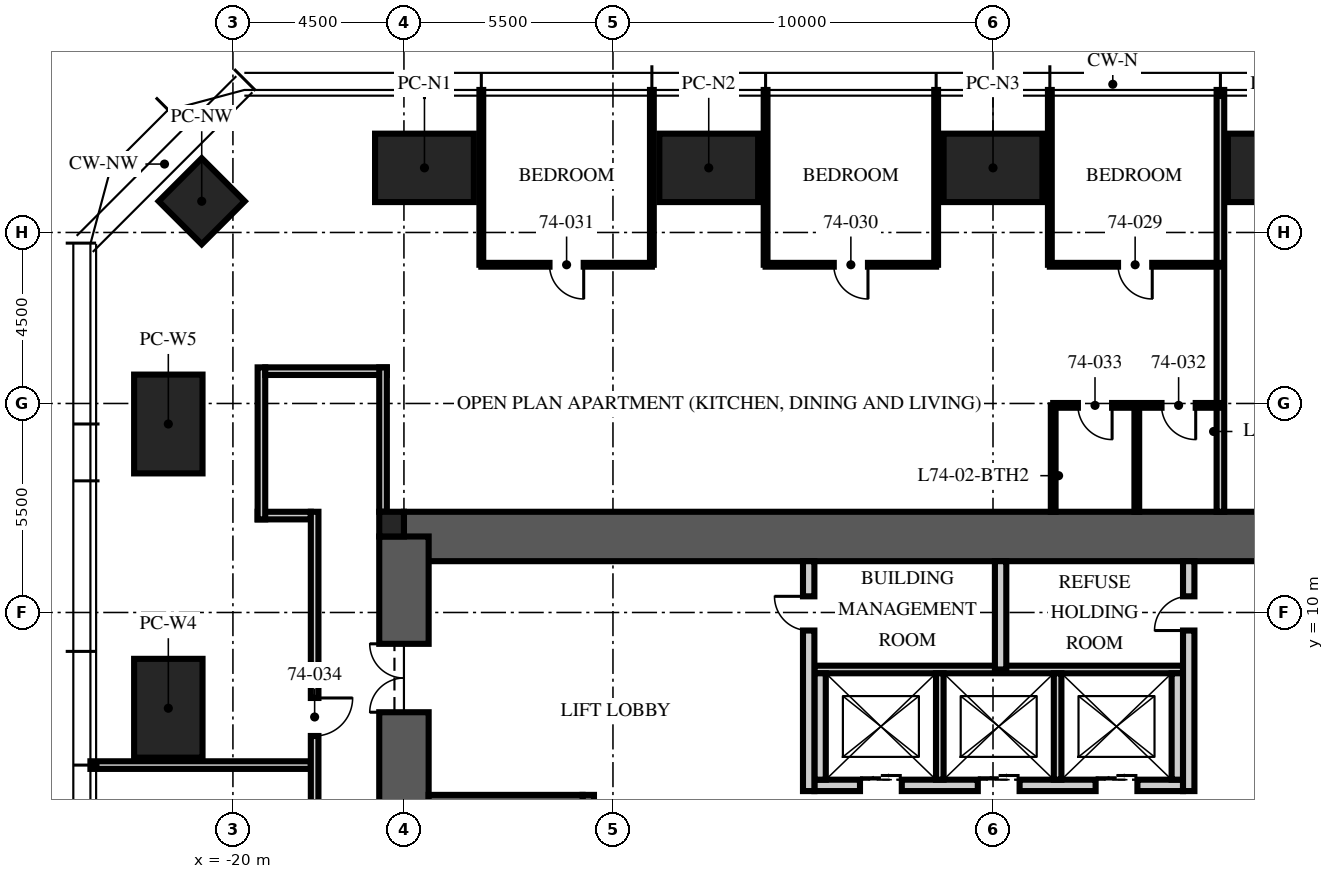
"""IFC4 building model, lengths in metres.
Left out: names, types, materials, properties, quantities, classifications, styles, units other than length and angle.
Written with IfcOpenShell. Run it as: python <this file> out.ifc"""

import sys

from ifc_helpers import new_model, si_unit, direction, frame, frame_2d, origin, origin_2d, place, context, subcontext, project, spatial, rectangle, extrude, element, fill, save


model = new_model("IFC4")
c1 = context("Model", 3, precision=1e-05, world=origin(), true_north=direction((0.0, 1.0)))
c2 = subcontext(c1, "Body", "Model", "MODEL_VIEW")
j1 = project(units=[si_unit("LENGTHUNIT", "METRE"), si_unit("PLANEANGLEUNIT", "RADIAN")], contexts=[c1])
p1 = place(None, origin())
s1 = spatial("IfcSite", under=j1, at=p1, CompositionType="ELEMENT")
p2 = place(p1, origin())
s2 = spatial("IfcBuilding", under=s1, at=p2, CompositionType="ELEMENT")
p3 = place(p2, frame((0.0, 0.0, 297.0)))
s3 = spatial("IfcBuildingStorey", under=s2, at=p3, CompositionType="ELEMENT", Elevation=297.0)
p4 = place(p3, frame((-15.5, 12.0, -0.25), z_axis=(0.0, 0.0, 1.0), x_axis=(1.0, 0.0, 0.0)))
e1 = element("IfcWall", 1, at=p4, inside=s3, PredefinedType="SHEAR", context=c2, shape_type="SweptSolid", body=[
    extrude(rectangle(XDim=31.0, YDim=1.3, at=frame_2d((15.5, 0.0))), origin(), (0.0, 0.0, 1.0), 3.75),
])
p5 = place(p3, frame((-15.5, -12.0, -0.25), z_axis=(0.0, 0.0, 1.0), x_axis=(0.0, 1.0, 0.0)))
e2 = element("IfcWall", 2, at=p5, inside=s3, PredefinedType="SHEAR", context=c2, shape_type="SweptSolid", body=[
    extrude(rectangle(XDim=24.0, YDim=1.3, at=frame_2d((12.0, 0.0))), origin(), (0.0, 0.0, 1.0), 3.75),
])
p6 = place(p5, frame((3.125, 0.0, 0.25)))
e3 = element("IfcOpeningElement", 3, at=p6, cuts=e2, PredefinedType="OPENING", context=c2, shape_type="SweptSolid", body=[
    extrude(rectangle(XDim=1.2, YDim=2.1, at=frame_2d((0.6, 1.05))), frame((0.0, 0.66, 0.0), z_axis=(0.0, -1.0, 0.0), x_axis=(1.0, 0.0, 0.0)), (0.0, 0.0, 1.0), 1.32),
])
p7 = place(p5, frame((19.375, 0.0, 0.25)))
e4 = element("IfcOpeningElement", 4, at=p7, cuts=e2, PredefinedType="OPENING", context=c2, shape_type="SweptSolid", body=[
    extrude(rectangle(XDim=1.8, YDim=2.1, at=frame_2d((0.9, 1.05))), frame((0.0, 0.66, 0.0), z_axis=(0.0, -1.0, 0.0), x_axis=(1.0, 0.0, 0.0)), (0.0, 0.0, 1.0), 1.32),
])
p8 = place(p3, frame((-15.825, 12.325, -0.25), z_axis=(0.0, 0.0, 1.0), x_axis=(1.0, 0.0, 0.0)))
e5 = element("IfcColumn", 5, at=p8, inside=s3, PredefinedType="COLUMN", context=c2, shape_type="SweptSolid", body=[
    extrude(rectangle(XDim=0.65, YDim=0.65, at=origin_2d()), origin(), (0.0, 0.0, 1.0), 3.75),
])
for number, where, z_axis, x_axis in (
    (6, (-14.96, 21.7, 0.0), (0.0, 0.0, 1.0), (1.0, 0.0, 0.0)),
    (7, (-7.48, 21.7, 0.0), (0.0, 0.0, 1.0), (1.0, 0.0, 0.0)),
    (8, (0.0, 21.7, 0.0), (0.0, 0.0, 1.0), (1.0, 0.0, 0.0)),
    (9, (7.48, 21.7, 0.0), (0.0, 0.0, 1.0), (1.0, 0.0, 0.0)),
    (10, (-21.7, 7.48, 0.0), (0.0, 0.0, 1.0), (0.0, 1.0, 0.0)),
    (11, (-21.7, 14.96, 0.0), (0.0, 0.0, 1.0), (0.0, 1.0, 0.0)),
):
    element("IfcColumn", number, at=place(p3, frame(where, z_axis=z_axis, x_axis=x_axis)), inside=s3, PredefinedType="COLUMN", context=c2, shape_type="SweptSolid", body=[
        extrude(rectangle(XDim=2.6, YDim=1.8, at=origin_2d()), origin(), (0.0, 0.0, 1.0), 3.75),
    ])
p9 = place(p3, frame((-20.821, 20.821, 0.0), z_axis=(0.0, 0.0, 1.0), x_axis=(0.707106781187, 0.707106781187, 0.0)))
e12 = element("IfcColumn", 12, at=p9, inside=s3, PredefinedType="COLUMN", context=c2, shape_type="SweptSolid", body=[
    extrude(rectangle(XDim=1.6, YDim=1.6, at=origin_2d()), origin(), (0.0, 0.0, 1.0), 3.75),
])
p10 = place(p3, frame((-10.65, -4.9, 0.0), z_axis=(0.0, 0.0, 1.0), x_axis=(0.0, 1.0, 0.0)))
e13 = element("IfcWall", 13, at=p10, inside=s3, PredefinedType="SOLIDWALL", context=c2, shape_type="SweptSolid", body=[
    extrude(rectangle(XDim=10.1, YDim=0.3, at=frame_2d((5.05, 0.0))), origin(), (0.0, 0.0, 1.0), 3.5),
])
p11 = place(p3, frame((-14.85, 5.05, 0.0), z_axis=(0.0, 0.0, 1.0), x_axis=(1.0, 0.0, 0.0)))
e14 = element("IfcWall", 14, at=p11, inside=s3, PredefinedType="SOLIDWALL", context=c2, shape_type="SweptSolid", body=[
    extrude(rectangle(XDim=4.05, YDim=0.3, at=frame_2d((2.025, 0.0))), origin(), (0.0, 0.0, 1.0), 3.5),
])
p12 = place(p3, frame((-4.7, 5.45, 0.0), z_axis=(0.0, 0.0, 1.0), x_axis=(1.0, 0.0, 0.0)))
e15 = element("IfcWall", 15, at=p12, inside=s3, PredefinedType="PARTITIONING", context=c2, shape_type="SweptSolid", body=[
    extrude(rectangle(XDim=9.7, YDim=0.3, at=frame_2d((4.85, 0.0))), origin(), (0.0, 0.0, 1.0), 3.5),
])
p13 = place(p12, frame((1.2, 0.0, 0.0)))
e16 = element("IfcOpeningElement", 16, at=p13, cuts=e15, PredefinedType="OPENING", context=c2, shape_type="SweptSolid", body=[
    extrude(rectangle(XDim=1.1, YDim=2.1, at=frame_2d((0.55, 1.05))), frame((0.0, 0.16, 0.0), z_axis=(0.0, -1.0, 0.0), x_axis=(1.0, 0.0, 0.0)), (0.0, 0.0, 1.0), 0.32),
])
p14 = place(p12, frame((4.3, 0.0, 0.0)))
e17 = element("IfcOpeningElement", 17, at=p14, cuts=e15, PredefinedType="OPENING", context=c2, shape_type="SweptSolid", body=[
    extrude(rectangle(XDim=1.1, YDim=2.1, at=frame_2d((0.55, 1.05))), frame((0.0, 0.16, 0.0), z_axis=(0.0, -1.0, 0.0), x_axis=(1.0, 0.0, 0.0)), (0.0, 0.0, 1.0), 0.32),
])
p15 = place(p12, frame((7.4, 0.0, 0.0)))
e18 = element("IfcOpeningElement", 18, at=p15, cuts=e15, PredefinedType="OPENING", context=c2, shape_type="SweptSolid", body=[
    extrude(rectangle(XDim=1.1, YDim=2.1, at=frame_2d((0.55, 1.05))), frame((0.0, 0.16, 0.0), z_axis=(0.0, -1.0, 0.0), x_axis=(1.0, 0.0, 0.0)), (0.0, 0.0, 1.0), 0.32),
])
p16 = place(p3, frame((-4.7, 8.5, 0.0), z_axis=(0.0, 0.0, 1.0), x_axis=(1.0, 0.0, 0.0)))
e19 = element("IfcWall", 19, at=p16, inside=s3, PredefinedType="PARTITIONING", context=c2, shape_type="SweptSolid", body=[
    extrude(rectangle(XDim=9.7, YDim=0.2, at=frame_2d((4.85, 0.0))), origin(), (0.0, 0.0, 1.0), 3.5),
])
for number, where, z_axis, x_axis in (
    (20, (-4.55, 5.6, 0.0), (0.0, 0.0, 1.0), (0.0, 1.0, 0.0)),
    (21, (4.85, 5.6, 0.0), (0.0, 0.0, 1.0), (0.0, 1.0, 0.0)),
):
    element("IfcWall", number, at=place(p3, frame(where, z_axis=z_axis, x_axis=x_axis)), inside=s3, PredefinedType="PARTITIONING", context=c2, shape_type="SweptSolid", body=[
        extrude(rectangle(XDim=2.8, YDim=0.3, at=frame_2d((1.4, 0.0))), origin(), (0.0, 0.0, 1.0), 3.5),
    ])
for number, where, z_axis, x_axis in (
    (22, (-1.4, 5.6, 0.0), (0.0, 0.0, 1.0), (0.0, 1.0, 0.0)),
    (23, (1.7, 5.6, 0.0), (0.0, 0.0, 1.0), (0.0, 1.0, 0.0)),
):
    element("IfcWall", number, at=place(p3, frame(where, z_axis=z_axis, x_axis=x_axis)), inside=s3, PredefinedType="PARTITIONING", context=c2, shape_type="SweptSolid", body=[
        extrude(rectangle(XDim=2.8, YDim=0.2, at=frame_2d((1.4, 0.0))), origin(), (0.0, 0.0, 1.0), 3.5),
    ])
p17 = place(p3, frame((-4.85, 5.3, 0.0), z_axis=(0.0, 0.0, 1.0), x_axis=(0.0, 1.0, 0.0)))
e24 = element("IfcWall", 24, at=p17, inside=s3, PredefinedType="PARTITIONING", context=c2, shape_type="SweptSolid", body=[
    extrude(rectangle(XDim=6.05, YDim=0.3, at=frame_2d((3.025, 0.0))), origin(), (0.0, 0.0, 1.0), 3.5),
])
p18 = place(p17, frame((4.225, 0.0, 0.0)))
e25 = element("IfcOpeningElement", 25, at=p18, cuts=e24, PredefinedType="OPENING", context=c2, shape_type="SweptSolid", body=[
    extrude(rectangle(XDim=0.9, YDim=2.1, at=frame_2d((0.45, 1.05))), frame((0.0, 0.16, 0.0), z_axis=(0.0, -1.0, 0.0), x_axis=(1.0, 0.0, 0.0)), (0.0, 0.0, 1.0), 0.32),
])
p19 = place(p3, frame((5.15, 5.3, 0.0), z_axis=(0.0, 0.0, 1.0), x_axis=(0.0, 1.0, 0.0)))
e26 = element("IfcWall", 26, at=p19, inside=s3, PredefinedType="PARTITIONING", context=c2, shape_type="SweptSolid", body=[
    extrude(rectangle(XDim=6.05, YDim=0.3, at=frame_2d((3.025, 0.0))), origin(), (0.0, 0.0, 1.0), 3.5),
])
p20 = place(p19, frame((4.225, 0.0, 0.0)))
e27 = element("IfcOpeningElement", 27, at=p20, cuts=e26, PredefinedType="OPENING", context=c2, shape_type="SweptSolid", body=[
    extrude(rectangle(XDim=0.9, YDim=2.1, at=frame_2d((0.45, 1.05))), frame((0.0, 0.16, 0.0), z_axis=(0.0, -1.0, 0.0), x_axis=(1.0, 0.0, 0.0)), (0.0, 0.0, 1.0), 0.32),
])
p21 = place(p3, frame((0.2, 8.5, 0.0), z_axis=(0.0, 0.0, 1.0), x_axis=(0.0, 1.0, 0.0)))
e28 = element("IfcWall", 28, at=p21, inside=s3, PredefinedType="PARTITIONING", context=c2, shape_type="SweptSolid", body=[
    extrude(rectangle(XDim=2.85, YDim=0.3, at=frame_2d((1.425, 0.0))), origin(), (0.0, 0.0, 1.0), 3.5),
])
p22 = place(p3, frame((-17.95, 12.55, 0.0), z_axis=(0.0, 0.0, 1.0), x_axis=(-1.0, 0.0, 0.0)))
e29 = element("IfcWall", 29, at=p22, inside=s3, PredefinedType="PARTITIONING", context=c2, shape_type="SweptSolid", body=[
    extrude(rectangle(XDim=1.4, YDim=0.2, at=frame_2d((0.7, 0.0))), origin(), (0.0, 0.0, 1.0), 3.5),
])
p23 = place(p3, frame((-19.25, 12.45, 0.0), z_axis=(0.0, 0.0, 1.0), x_axis=(0.0, 1.0, 0.0)))
e30 = element("IfcWall", 30, at=p23, inside=s3, PredefinedType="PARTITIONING", context=c2, shape_type="SweptSolid", body=[
    extrude(rectangle(XDim=4.0, YDim=0.2, at=frame_2d((2.0, 0.0))), origin(), (0.0, 0.0, 1.0), 2.9),
])
p24 = place(p3, frame((-19.15, 16.35, 0.0), z_axis=(0.0, 0.0, 1.0), x_axis=(1.0, 0.0, 0.0)))
e31 = element("IfcWall", 31, at=p24, inside=s3, PredefinedType="PARTITIONING", context=c2, shape_type="SweptSolid", body=[
    extrude(rectangle(XDim=3.2, YDim=0.2, at=frame_2d((1.6, 0.0))), origin(), (0.0, 0.0, 1.0), 2.6),
])
p25 = place(p3, frame((-16.05, 16.45, 0.0), z_axis=(0.0, 0.0, 1.0), x_axis=(0.0, -1.0, 0.0)))
e32 = element("IfcWall", 32, at=p25, inside=s3, PredefinedType="PARTITIONING", context=c2, shape_type="SweptSolid", body=[
    extrude(rectangle(XDim=3.8, YDim=0.2, at=frame_2d((1.9, 0.0))), origin(), (0.0, 0.0, 1.0), 2.6),
])
p26 = place(p3, frame((5.984, 12.65, 0.0), z_axis=(0.0, 0.0, 1.0), x_axis=(0.0, 1.0, 0.0)))
e33 = element("IfcWall", 33, at=p26, inside=s3, PredefinedType="PARTITIONING", context=c2, shape_type="SweptSolid", body=[
    extrude(rectangle(XDim=11.1, YDim=0.2, at=frame_2d((5.55, 0.0))), origin(), (0.0, 0.0, 1.0), 3.01),
])
for number, where, z_axis, x_axis in (
    (34, (1.496, 19.15, 0.0), (0.0, 0.0, 1.0), (0.0, 1.0, 0.0)),
    (35, (-1.496, 19.15, 0.0), (0.0, 0.0, 1.0), (0.0, 1.0, 0.0)),
    (36, (-5.984, 19.15, 0.0), (0.0, 0.0, 1.0), (0.0, 1.0, 0.0)),
    (37, (-8.976, 19.15, 0.0), (0.0, 0.0, 1.0), (0.0, 1.0, 0.0)),
    (38, (-13.464, 19.15, 0.0), (0.0, 0.0, 1.0), (0.0, 1.0, 0.0)),
):
    element("IfcWall", number, at=place(p3, frame(where, z_axis=z_axis, x_axis=x_axis)), inside=s3, PredefinedType="PARTITIONING", context=c2, shape_type="SweptSolid", body=[
        extrude(rectangle(XDim=4.6, YDim=0.1, at=frame_2d((2.3, 0.0))), origin(), (0.0, 0.0, 1.0), 3.01),
    ])
p27 = place(p3, frame((-17.95, 5.984, 0.0), z_axis=(0.0, 0.0, 1.0), x_axis=(-1.0, 0.0, 0.0)))
e39 = element("IfcWall", 39, at=p27, inside=s3, PredefinedType="PARTITIONING", context=c2, shape_type="SweptSolid", body=[
    extrude(rectangle(XDim=5.8, YDim=0.2, at=frame_2d((2.9, 0.0))), origin(), (0.0, 0.0, 1.0), 3.01),
])
p28 = place(p3, frame((5.984, 19.15, 0.0), z_axis=(0.0, 0.0, 1.0), x_axis=(-1.0, 0.0, 0.0)))
e40 = element("IfcWall", 40, at=p28, inside=s3, PredefinedType="PARTITIONING", context=c2, shape_type="SweptSolid", body=[
    extrude(rectangle(XDim=4.488, YDim=0.1, at=frame_2d((2.244, 0.0))), origin(), (0.0, 0.0, 1.0), 2.91),
])
p29 = place(p28, frame((1.794, 0.0, 0.0)))
e41 = element("IfcOpeningElement", 41, at=p29, cuts=e40, PredefinedType="OPENING", context=c2, shape_type="SweptSolid", body=[
    extrude(rectangle(XDim=0.9, YDim=2.1, at=frame_2d((0.45, 1.05))), frame((0.0, 0.06, 0.0), z_axis=(0.0, -1.0, 0.0), x_axis=(1.0, 0.0, 0.0)), (0.0, 0.0, 1.0), 0.12),
])
p30 = place(p3, frame((-1.496, 19.15, 0.0), z_axis=(0.0, 0.0, 1.0), x_axis=(-1.0, 0.0, 0.0)))
e42 = element("IfcWall", 42, at=p30, inside=s3, PredefinedType="PARTITIONING", context=c2, shape_type="SweptSolid", body=[
    extrude(rectangle(XDim=4.488, YDim=0.1, at=frame_2d((2.244, 0.0))), origin(), (0.0, 0.0, 1.0), 2.91),
])
p31 = place(p30, frame((1.794, 0.0, 0.0)))
e43 = element("IfcOpeningElement", 43, at=p31, cuts=e42, PredefinedType="OPENING", context=c2, shape_type="SweptSolid", body=[
    extrude(rectangle(XDim=0.9, YDim=2.1, at=frame_2d((0.45, 1.05))), frame((0.0, 0.06, 0.0), z_axis=(0.0, -1.0, 0.0), x_axis=(1.0, 0.0, 0.0)), (0.0, 0.0, 1.0), 0.12),
])
p32 = place(p3, frame((-8.976, 19.15, 0.0), z_axis=(0.0, 0.0, 1.0), x_axis=(-1.0, 0.0, 0.0)))
e44 = element("IfcWall", 44, at=p32, inside=s3, PredefinedType="PARTITIONING", context=c2, shape_type="SweptSolid", body=[
    extrude(rectangle(XDim=4.488, YDim=0.1, at=frame_2d((2.244, 0.0))), origin(), (0.0, 0.0, 1.0), 2.91),
])
p33 = place(p32, frame((1.794, 0.0, 0.0)))
e45 = element("IfcOpeningElement", 45, at=p33, cuts=e44, PredefinedType="OPENING", context=c2, shape_type="SweptSolid", body=[
    extrude(rectangle(XDim=0.9, YDim=2.1, at=frame_2d((0.45, 1.05))), frame((0.0, 0.06, 0.0), z_axis=(0.0, -1.0, 0.0), x_axis=(1.0, 0.0, 0.0)), (0.0, 0.0, 1.0), 0.12),
])
p34 = place(p3, frame((5.984, 15.45, 0.0), z_axis=(0.0, 0.0, 1.0), x_axis=(-1.0, 0.0, 0.0)))
e46 = element("IfcWall", 46, at=p34, inside=s3, PredefinedType="PARTITIONING", context=c2, shape_type="SweptSolid", body=[
    extrude(rectangle(XDim=4.4, YDim=0.125, at=frame_2d((2.2, 0.0))), origin(), (0.0, 0.0, 1.0), 2.91),
])
p35 = place(p34, frame((0.65, 0.0, 0.0)))
e47 = element("IfcOpeningElement", 47, at=p35, cuts=e46, PredefinedType="OPENING", context=c2, shape_type="SweptSolid", body=[
    extrude(rectangle(XDim=0.9, YDim=2.1, at=frame_2d((0.45, 1.05))), frame((0.0, 0.073, 0.0), z_axis=(0.0, -1.0, 0.0), x_axis=(1.0, 0.0, 0.0)), (0.0, 0.0, 1.0), 0.145),
])
p36 = place(p34, frame((2.85, 0.0, 0.0)))
e48 = element("IfcOpeningElement", 48, at=p36, cuts=e46, PredefinedType="OPENING", context=c2, shape_type="SweptSolid", body=[
    extrude(rectangle(XDim=0.9, YDim=2.1, at=frame_2d((0.45, 1.05))), frame((0.0, 0.073, 0.0), z_axis=(0.0, -1.0, 0.0), x_axis=(1.0, 0.0, 0.0)), (0.0, 0.0, 1.0), 0.145),
])
p37 = place(p3, frame((3.784, 12.65, 0.0), z_axis=(0.0, 0.0, 1.0), x_axis=(0.0, 1.0, 0.0)))
e49 = element("IfcWall", 49, at=p37, inside=s3, PredefinedType="PARTITIONING", context=c2, shape_type="SweptSolid", body=[
    extrude(rectangle(XDim=2.8, YDim=0.125, at=frame_2d((1.4, 0.0))), origin(), (0.0, 0.0, 1.0), 2.91),
])
p38 = place(p3, frame((1.584, 12.65, 0.0), z_axis=(0.0, 0.0, 1.0), x_axis=(0.0, 1.0, 0.0)))
e50 = element("IfcWall", 50, at=p38, inside=s3, PredefinedType="PARTITIONING", context=c2, shape_type="SweptSolid", body=[
    extrude(rectangle(XDim=2.8, YDim=0.125, at=frame_2d((1.4, 0.0))), origin(), (0.0, 0.0, 1.0), 3.5),
])
p39 = place(p3, frame((-17.85, 12.65, 0.0), z_axis=(0.0, 0.0, 1.0), x_axis=(0.0, -1.0, 0.0)))
e51 = element("IfcWall", 51, at=p39, inside=s3, PredefinedType="PARTITIONING", context=c2, shape_type="SweptSolid", body=[
    extrude(rectangle(XDim=25.5, YDim=0.2, at=frame_2d((12.75, 0.0))), origin(), (0.0, 0.0, 1.0), 2.9),
])
p40 = place(p39, frame((4.9, 0.0, 0.0)))
e52 = element("IfcOpeningElement", 52, at=p40, cuts=e51, PredefinedType="OPENING", context=c2, shape_type="SweptSolid", body=[
    extrude(rectangle(XDim=1.0, YDim=2.2, at=frame_2d((0.5, 1.1))), frame((0.0, 0.11, 0.0), z_axis=(0.0, -1.0, 0.0), x_axis=(1.0, 0.0, 0.0)), (0.0, 0.0, 1.0), 0.22),
])
p41 = place(p39, frame((23.186, 0.0, 0.0)))
e53 = element("IfcOpeningElement", 53, at=p41, cuts=e51, PredefinedType="OPENING", context=c2, shape_type="SweptSolid", body=[
    extrude(rectangle(XDim=1.0, YDim=2.2, at=frame_2d((0.5, 1.1))), frame((0.0, 0.11, 0.0), z_axis=(0.0, -1.0, 0.0), x_axis=(1.0, 0.0, 0.0)), (0.0, 0.0, 1.0), 0.22),
])
p42 = place(p7, origin())
e54 = element("IfcDoor", 54, at=p42, inside=s3, OperationType="DOUBLE_DOOR_SINGLE_SWING", PredefinedType="DOOR", context=c2, shape_type="SweptSolid", body=[
    extrude(rectangle(XDim=1.8, YDim=2.1, at=frame_2d((0.9, 1.05))), frame((0.0, 0.025, 0.0), z_axis=(0.0, -1.0, 0.0), x_axis=(1.0, 0.0, 0.0)), (0.0, 0.0, 1.0), 0.05),
])
fill(e4, e54)
p43 = place(p13, origin())
e55 = element("IfcDoor", 55, at=p43, inside=s3, OperationType="DOUBLE_DOOR_SLIDING", PredefinedType="DOOR", context=c2, shape_type="SweptSolid", body=[
    extrude(rectangle(XDim=1.1, YDim=2.1, at=frame_2d((0.55, 1.05))), frame((0.0, 0.025, 0.0), z_axis=(0.0, -1.0, 0.0), x_axis=(1.0, 0.0, 0.0)), (0.0, 0.0, 1.0), 0.05),
])
fill(e16, e55)
p44 = place(p14, origin())
e56 = element("IfcDoor", 56, at=p44, inside=s3, OperationType="DOUBLE_DOOR_SLIDING", PredefinedType="DOOR", context=c2, shape_type="SweptSolid", body=[
    extrude(rectangle(XDim=1.1, YDim=2.1, at=frame_2d((0.55, 1.05))), frame((0.0, 0.025, 0.0), z_axis=(0.0, -1.0, 0.0), x_axis=(1.0, 0.0, 0.0)), (0.0, 0.0, 1.0), 0.05),
])
fill(e17, e56)
p45 = place(p15, origin())
e57 = element("IfcDoor", 57, at=p45, inside=s3, OperationType="DOUBLE_DOOR_SLIDING", PredefinedType="DOOR", context=c2, shape_type="SweptSolid", body=[
    extrude(rectangle(XDim=1.1, YDim=2.1, at=frame_2d((0.55, 1.05))), frame((0.0, 0.025, 0.0), z_axis=(0.0, -1.0, 0.0), x_axis=(1.0, 0.0, 0.0)), (0.0, 0.0, 1.0), 0.05),
])
fill(e18, e57)
p46 = place(p18, origin())
e58 = element("IfcDoor", 58, at=p46, inside=s3, OperationType="SINGLE_SWING_RIGHT", PredefinedType="DOOR", context=c2, shape_type="SweptSolid", body=[
    extrude(rectangle(XDim=0.9, YDim=2.1, at=frame_2d((0.45, 1.05))), frame((0.0, 0.025, 0.0), z_axis=(0.0, -1.0, 0.0), x_axis=(1.0, 0.0, 0.0)), (0.0, 0.0, 1.0), 0.05),
])
fill(e25, e58)
p47 = place(p20, origin())
e59 = element("IfcDoor", 59, at=p47, inside=s3, OperationType="SINGLE_SWING_LEFT", PredefinedType="DOOR", context=c2, shape_type="SweptSolid", body=[
    extrude(rectangle(XDim=0.9, YDim=2.1, at=frame_2d((0.45, 1.05))), frame((0.0, 0.025, 0.0), z_axis=(0.0, -1.0, 0.0), x_axis=(1.0, 0.0, 0.0)), (0.0, 0.0, 1.0), 0.05),
])
fill(e27, e59)
p48 = place(p29, origin())
e60 = element("IfcDoor", 60, at=p48, inside=s3, OperationType="SINGLE_SWING_LEFT", PredefinedType="DOOR", context=c2, shape_type="SweptSolid", body=[
    extrude(rectangle(XDim=0.9, YDim=2.1, at=frame_2d((0.45, 1.05))), frame((0.0, 0.025, 0.0), z_axis=(0.0, -1.0, 0.0), x_axis=(1.0, 0.0, 0.0)), (0.0, 0.0, 1.0), 0.05),
])
fill(e41, e60)
p49 = place(p31, origin())
e61 = element("IfcDoor", 61, at=p49, inside=s3, OperationType="SINGLE_SWING_LEFT", PredefinedType="DOOR", context=c2, shape_type="SweptSolid", body=[
    extrude(rectangle(XDim=0.9, YDim=2.1, at=frame_2d((0.45, 1.05))), frame((0.0, 0.025, 0.0), z_axis=(0.0, -1.0, 0.0), x_axis=(1.0, 0.0, 0.0)), (0.0, 0.0, 1.0), 0.05),
])
fill(e43, e61)
p50 = place(p33, origin())
e62 = element("IfcDoor", 62, at=p50, inside=s3, OperationType="SINGLE_SWING_LEFT", PredefinedType="DOOR", context=c2, shape_type="SweptSolid", body=[
    extrude(rectangle(XDim=0.9, YDim=2.1, at=frame_2d((0.45, 1.05))), frame((0.0, 0.025, 0.0), z_axis=(0.0, -1.0, 0.0), x_axis=(1.0, 0.0, 0.0)), (0.0, 0.0, 1.0), 0.05),
])
fill(e45, e62)
p51 = place(p35, origin())
e63 = element("IfcDoor", 63, at=p51, inside=s3, OperationType="SINGLE_SWING_LEFT", PredefinedType="DOOR", context=c2, shape_type="SweptSolid", body=[
    extrude(rectangle(XDim=0.9, YDim=2.1, at=frame_2d((0.45, 1.05))), frame((0.0, 0.025, 0.0), z_axis=(0.0, -1.0, 0.0), x_axis=(1.0, 0.0, 0.0)), (0.0, 0.0, 1.0), 0.05),
])
fill(e47, e63)
p52 = place(p36, origin())
e64 = element("IfcDoor", 64, at=p52, inside=s3, OperationType="SINGLE_SWING_LEFT", PredefinedType="DOOR", context=c2, shape_type="SweptSolid", body=[
    extrude(rectangle(XDim=0.9, YDim=2.1, at=frame_2d((0.45, 1.05))), frame((0.0, 0.025, 0.0), z_axis=(0.0, -1.0, 0.0), x_axis=(1.0, 0.0, 0.0)), (0.0, 0.0, 1.0), 0.05),
])
fill(e48, e64)
p53 = place(p40, origin())
e65 = element("IfcDoor", 65, at=p53, inside=s3, OperationType="SINGLE_SWING_LEFT", PredefinedType="DOOR", context=c2, shape_type="SweptSolid", body=[
    extrude(rectangle(XDim=1.0, YDim=2.2, at=frame_2d((0.5, 1.1))), frame((0.0, 0.025, 0.0), z_axis=(0.0, -1.0, 0.0), x_axis=(1.0, 0.0, 0.0)), (0.0, 0.0, 1.0), 0.05),
])
fill(e52, e65)
save(model, sys.argv[1])
